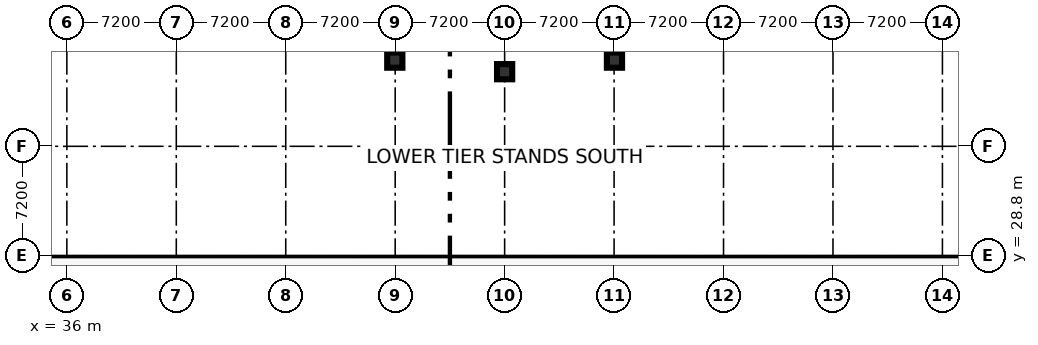
"""IFC4 building model, lengths in metres.
Left out: names, types, materials, properties, quantities, classifications, styles, units other than length and angle.
Written with IfcOpenShell. Run it as: python <this file> out.ifc"""

import sys

from ifc_helpers import new_model, si_unit, direction, frame, origin, origin_2d, place, context, subcontext, project, spatial, circle, extrude, element, save


model = new_model("IFC4")
c1 = context("Model", 3, precision=1e-05, world=origin(), true_north=direction((0.0, 1.0)))
c2 = subcontext(c1, "Body", "Model", "MODEL_VIEW")
j1 = project(units=[si_unit("LENGTHUNIT", "METRE"), si_unit("PLANEANGLEUNIT", "RADIAN")], contexts=[c1])
p1 = place(None, origin())
s1 = spatial("IfcSite", under=j1, at=p1, CompositionType="ELEMENT")
p2 = place(p1, origin())
s2 = spatial("IfcBuilding", under=s1, at=p2, CompositionType="ELEMENT")
p3 = place(p2, origin())
s3 = spatial("IfcBuildingStorey", under=s2, at=p3, CompositionType="ELEMENT", Elevation=0.0)
for number, where, z_axis, x_axis in (
    (1, (57.574, 41.67, 0.0), (0.0, 0.0, 1.0), (1.0, 0.0, 0.0)),
    (2, (64.8, 40.909, 0.0), (0.0, 0.0, 1.0), (1.0, 0.0, 0.0)),
    (3, (72.026, 41.67, 0.0), (0.0, 0.0, 1.0), (1.0, 0.0, 0.0)),
):
    element("IfcColumn", number, at=place(p3, frame(where, z_axis=z_axis, x_axis=x_axis)), inside=s3, PredefinedType="COLUMN", context=c2, shape_type="SweptSolid", body=[
        extrude(circle(Radius=0.5, at=origin_2d()), origin(), (0.0, 0.0, 1.0), 5.4),
    ])
save(model, sys.argv[1])
